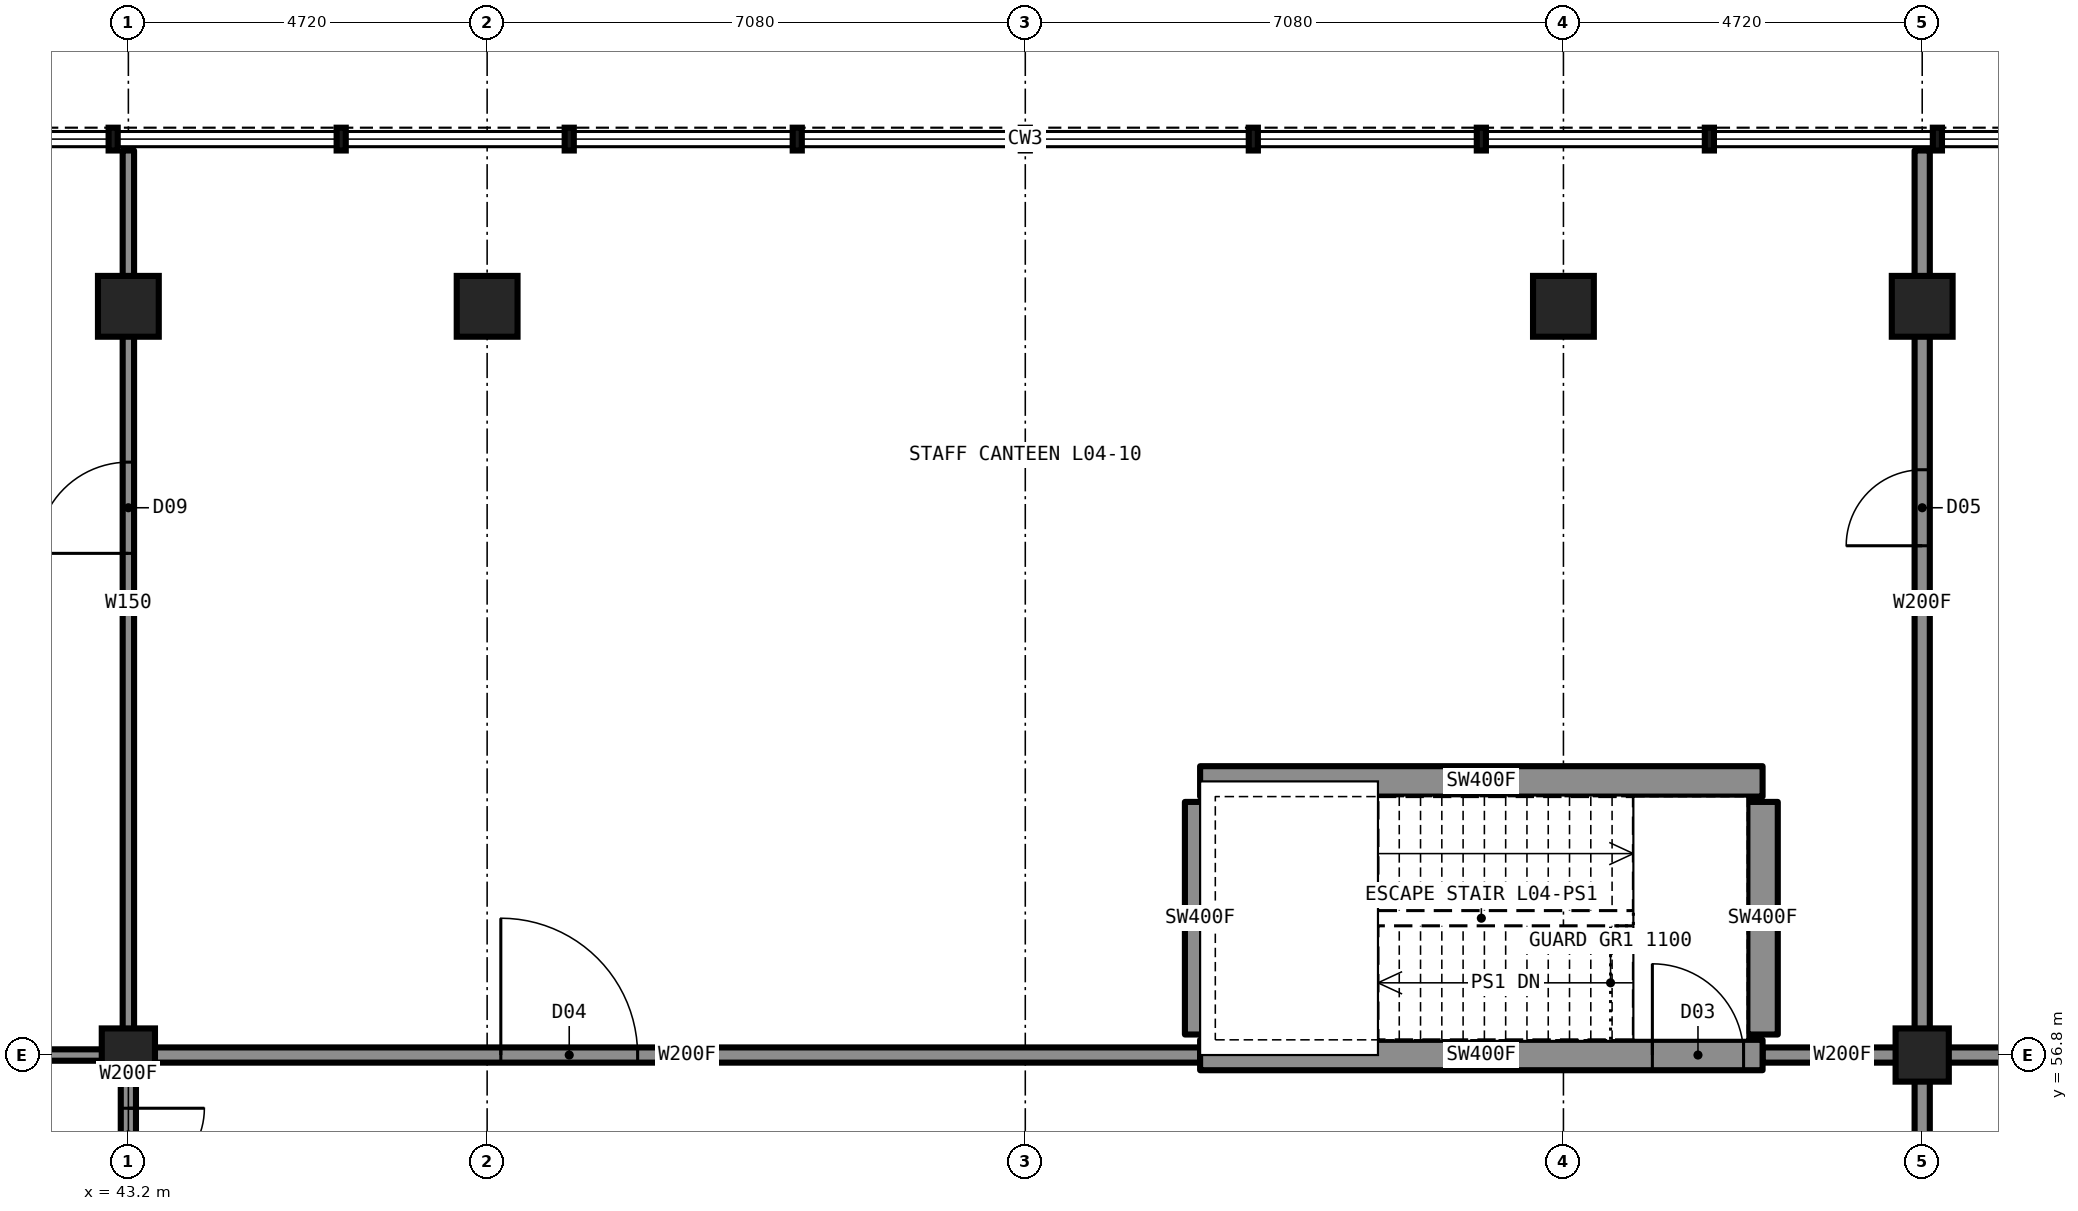
"""IFC4 building model, lengths in metres.
Left out: names, types, materials, properties, quantities, classifications, styles, units other than length and angle.
Written with IfcOpenShell. Run it as: python <this file> out.ifc"""

import sys

from ifc_helpers import new_model, si_unit, direction, frame, frame_2d, origin, origin_2d, place, context, subcontext, project, spatial, rectangle, hollow_rectangle, extrude, element, fill, save


model = new_model("IFC4")
c1 = context("Model", 3, precision=1e-05, world=origin(), true_north=direction((0.0, 1.0)))
c2 = subcontext(c1, "Body", "Model", "MODEL_VIEW")
j1 = project(units=[si_unit("LENGTHUNIT", "METRE"), si_unit("PLANEANGLEUNIT", "RADIAN")], contexts=[c1])
p1 = place(None, origin())
s1 = spatial("IfcSite", under=j1, at=p1, CompositionType="ELEMENT")
p2 = place(p1, origin())
s2 = spatial("IfcBuilding", under=s1, at=p2, CompositionType="ELEMENT")
p3 = place(p2, frame((0.0, 0.0, 20.5)))
s3 = spatial("IfcBuildingStorey", under=s2, at=p3, CompositionType="ELEMENT", Elevation=20.5)
for number, where, z_axis, x_axis in (
    (1, (43.2, 66.65, 0.0), (0.0, 0.0, 1.0), (1.0, 0.0, 0.0)),
    (2, (47.92, 66.65, 0.0), (0.0, 0.0, 1.0), (1.0, 0.0, 0.0)),
    (3, (62.08, 66.65, 0.0), (0.0, 0.0, 1.0), (1.0, 0.0, 0.0)),
    (4, (66.8, 66.65, 0.0), (0.0, 0.0, 1.0), (1.0, 0.0, 0.0)),
):
    element("IfcColumn", number, at=place(p3, frame(where, z_axis=z_axis, x_axis=x_axis)), inside=s3, PredefinedType="COLUMN", context=c2, shape_type="SweptSolid", body=[
        extrude(hollow_rectangle(XDim=0.8, YDim=0.8, WallThickness=0.05, at=origin_2d()), origin(), (0.0, 0.0, 1.0), 4.5),
    ])
for number, where, z_axis, x_axis in (
    (5, (43.2, 56.8, 0.0), (0.0, 0.0, 1.0), (1.0, 0.0, 0.0)),
    (6, (66.8, 56.8, 0.0), (0.0, 0.0, 1.0), (1.0, 0.0, 0.0)),
):
    element("IfcColumn", number, at=place(p3, frame(where, z_axis=z_axis, x_axis=x_axis)), inside=s3, PredefinedType="COLUMN", context=c2, shape_type="SweptSolid", body=[
        extrude(hollow_rectangle(XDim=0.7, YDim=0.7, WallThickness=0.06, at=origin_2d()), origin(), (0.0, 0.0, 1.0), 4.5),
    ])
p4 = place(p3, frame((43.2, 56.8, 0.0), z_axis=(0.0, 0.0, 1.0), x_axis=(1.0, 0.0, 0.0)))
e7 = element("IfcWall", 7, at=p4, inside=s3, PredefinedType="PARTITIONING", context=c2, shape_type="SweptSolid", body=[
    extrude(rectangle(XDim=14.1, YDim=0.2, at=frame_2d((7.05, 0.0))), origin(), (0.0, 0.0, 1.0), 4.33),
])
p5 = place(p4, frame((4.9, 0.0, 0.0)))
e8 = element("IfcOpeningElement", 8, at=p5, cuts=e7, PredefinedType="OPENING", context=c2, shape_type="SweptSolid", body=[
    extrude(rectangle(XDim=1.8, YDim=2.2, at=frame_2d((0.9, 1.1))), frame((0.0, 0.11, 0.0), z_axis=(0.0, -1.0, 0.0), x_axis=(1.0, 0.0, 0.0)), (0.0, 0.0, 1.0), 0.22),
])
p6 = place(p3, frame((64.7, 56.8, 0.0), z_axis=(0.0, 0.0, 1.0), x_axis=(1.0, 0.0, 0.0)))
e9 = element("IfcWall", 9, at=p6, inside=s3, PredefinedType="PARTITIONING", context=c2, shape_type="SweptSolid", body=[
    extrude(rectangle(XDim=2.1, YDim=0.2, at=frame_2d((1.05, 0.0))), origin(), (0.0, 0.0, 1.0), 4.33),
])
p7 = place(p3, frame((66.8, 56.8, 0.0), z_axis=(0.0, 0.0, 1.0), x_axis=(1.0, 0.0, 0.0)))
e10 = element("IfcWall", 10, at=p7, inside=s3, PredefinedType="PARTITIONING", context=c2, shape_type="SweptSolid", body=[
    extrude(rectangle(XDim=11.945, YDim=0.2, at=frame_2d((5.973, 0.0))), origin(), (0.0, 0.0, 1.0), 3.13),
])
p8 = place(p7, frame((5.7, 0.0, 0.0)))
e11 = element("IfcOpeningElement", 11, at=p8, cuts=e10, PredefinedType="OPENING", context=c2, shape_type="SweptSolid", body=[
    extrude(rectangle(XDim=1.0, YDim=2.1, at=frame_2d((0.5, 1.05))), frame((0.0, 0.11, 0.0), z_axis=(0.0, -1.0, 0.0), x_axis=(1.0, 0.0, 0.0)), (0.0, 0.0, 1.0), 0.22),
])
p9 = place(p3, frame((57.3, 56.8, 0.0), z_axis=(0.0, 0.0, 1.0), x_axis=(1.0, 0.0, 0.0)))
e12 = element("IfcWall", 12, at=p9, inside=s3, PredefinedType="SHEAR", context=c2, shape_type="SweptSolid", body=[
    extrude(rectangle(XDim=7.4, YDim=0.4, at=frame_2d((3.7, 0.0))), origin(), (0.0, 0.0, 1.0), 4.5),
])
p10 = place(p9, frame((5.95, 0.0, 0.0)))
e13 = element("IfcOpeningElement", 13, at=p10, cuts=e12, PredefinedType="OPENING", context=c2, shape_type="SweptSolid", body=[
    extrude(rectangle(XDim=1.2, YDim=2.2, at=frame_2d((0.6, 1.1))), frame((0.0, 0.21, 0.0), z_axis=(0.0, -1.0, 0.0), x_axis=(1.0, 0.0, 0.0)), (0.0, 0.0, 1.0), 0.42),
])
p11 = place(p3, frame((57.3, 60.4, 0.0), z_axis=(0.0, 0.0, 1.0), x_axis=(1.0, 0.0, 0.0)))
e14 = element("IfcWall", 14, at=p11, inside=s3, PredefinedType="SHEAR", context=c2, shape_type="SweptSolid", body=[
    extrude(rectangle(XDim=7.4, YDim=0.4, at=frame_2d((3.7, 0.0))), origin(), (0.0, 0.0, 1.0), 4.5),
])
p12 = place(p3, frame((43.2, 56.8, 0.0), z_axis=(0.0, 0.0, 1.0), x_axis=(0.0, 1.0, 0.0)))
e15 = element("IfcWall", 15, at=p12, inside=s3, PredefinedType="PARTITIONING", context=c2, shape_type="SweptSolid", body=[
    extrude(rectangle(XDim=11.9, YDim=0.15, at=frame_2d((5.95, 0.0))), origin(), (0.0, 0.0, 1.0), 3.13),
])
p13 = place(p12, frame((6.6, 0.0, 0.0)))
e16 = element("IfcOpeningElement", 16, at=p13, cuts=e15, PredefinedType="OPENING", context=c2, shape_type="SweptSolid", body=[
    extrude(rectangle(XDim=1.2, YDim=2.2, at=frame_2d((0.6, 1.1))), frame((0.0, 0.085, 0.0), z_axis=(0.0, -1.0, 0.0), x_axis=(1.0, 0.0, 0.0)), (0.0, 0.0, 1.0), 0.17),
])
p14 = place(p3, frame((66.8, 42.7, 0.0), z_axis=(0.0, 0.0, 1.0), x_axis=(0.0, 1.0, 0.0)))
e17 = element("IfcWall", 17, at=p14, inside=s3, PredefinedType="PARTITIONING", context=c2, shape_type="SweptSolid", body=[
    extrude(rectangle(XDim=14.1, YDim=0.2, at=frame_2d((7.05, 0.0))), origin(), (0.0, 0.0, 1.0), 4.33),
])
p15 = place(p14, frame((8.8, 0.0, 0.0)))
e18 = element("IfcOpeningElement", 18, at=p15, cuts=e17, PredefinedType="OPENING", context=c2, shape_type="SweptSolid", body=[
    extrude(rectangle(XDim=1.0, YDim=2.1, at=frame_2d((0.5, 1.05))), frame((0.0, 0.11, 0.0), z_axis=(0.0, -1.0, 0.0), x_axis=(1.0, 0.0, 0.0)), (0.0, 0.0, 1.0), 0.22),
])
p16 = place(p3, frame((66.8, 56.8, 0.0), z_axis=(0.0, 0.0, 1.0), x_axis=(0.0, 1.0, 0.0)))
e19 = element("IfcWall", 19, at=p16, inside=s3, PredefinedType="PARTITIONING", context=c2, shape_type="SweptSolid", body=[
    extrude(rectangle(XDim=11.9, YDim=0.2, at=frame_2d((5.95, 0.0))), origin(), (0.0, 0.0, 1.0), 3.13),
])
p17 = place(p16, frame((6.7, 0.0, 0.0)))
e20 = element("IfcOpeningElement", 20, at=p17, cuts=e19, PredefinedType="OPENING", context=c2, shape_type="SweptSolid", body=[
    extrude(rectangle(XDim=1.0, YDim=2.1, at=frame_2d((0.5, 1.05))), frame((0.0, 0.11, 0.0), z_axis=(0.0, -1.0, 0.0), x_axis=(1.0, 0.0, 0.0)), (0.0, 0.0, 1.0), 0.22),
])
for number, where, z_axis, x_axis in (
    (21, (57.3, 57.07, 0.0), (0.0, 0.0, 1.0), (0.0, 1.0, 0.0)),
    (22, (64.7, 57.07, 0.0), (0.0, 0.0, 1.0), (0.0, 1.0, 0.0)),
):
    element("IfcWall", number, at=place(p3, frame(where, z_axis=z_axis, x_axis=x_axis)), inside=s3, PredefinedType="SHEAR", context=c2, shape_type="SweptSolid", body=[
        extrude(rectangle(XDim=3.06, YDim=0.4, at=frame_2d((1.53, 0.0))), origin(), (0.0, 0.0, 1.0), 4.5),
    ])
p18 = place(p3, frame((43.2, 56.74, 0.0), z_axis=(0.0, 0.0, 1.0), x_axis=(0.0, -1.0, 0.0)))
e23 = element("IfcWall", 23, at=p18, inside=s3, PredefinedType="PARTITIONING", context=c2, shape_type="SweptSolid", body=[
    extrude(rectangle(XDim=1.98, YDim=0.2, at=frame_2d((0.99, 0.0))), origin(), (0.0, 0.0, 1.0), 4.33),
])
p19 = place(p18, frame((0.64, 0.0, 0.0)))
e24 = element("IfcOpeningElement", 24, at=p19, cuts=e23, PredefinedType="OPENING", context=c2, shape_type="SweptSolid", body=[
    extrude(rectangle(XDim=1.0, YDim=2.1, at=frame_2d((0.5, 1.05))), frame((0.0, 0.11, 0.0), z_axis=(0.0, -1.0, 0.0), x_axis=(1.0, 0.0, 0.0)), (0.0, 0.0, 1.0), 0.22),
])
p20 = place(p3, frame((39.76, 56.8, 0.0), z_axis=(0.0, 0.0, 1.0), x_axis=(1.0, 0.0, 0.0)))
e25 = element("IfcWall", 25, at=p20, inside=s3, PredefinedType="PARTITIONING", context=c2, shape_type="SweptSolid", body=[
    extrude(rectangle(XDim=3.38, YDim=0.15, at=frame_2d((1.69, 0.0))), origin(), (0.0, 0.0, 1.0), 3.13),
])
p21 = place(p10, origin())
e26 = element("IfcDoor", 26, at=p21, inside=s3, OperationType="SINGLE_SWING_LEFT", PredefinedType="DOOR", context=c2, shape_type="SweptSolid", body=[
    extrude(rectangle(XDim=1.2, YDim=2.2, at=frame_2d((0.6, 1.1))), frame((0.0, 0.025, 0.0), z_axis=(0.0, -1.0, 0.0), x_axis=(1.0, 0.0, 0.0)), (0.0, 0.0, 1.0), 0.05),
])
fill(e13, e26)
p22 = place(p13, origin())
e27 = element("IfcDoor", 27, at=p22, inside=s3, OperationType="SINGLE_SWING_LEFT", PredefinedType="DOOR", context=c2, shape_type="SweptSolid", body=[
    extrude(rectangle(XDim=1.2, YDim=2.2, at=frame_2d((0.6, 1.1))), frame((0.0, 0.025, 0.0), z_axis=(0.0, -1.0, 0.0), x_axis=(1.0, 0.0, 0.0)), (0.0, 0.0, 1.0), 0.05),
])
fill(e16, e27)
p23 = place(p5, origin())
e28 = element("IfcDoor", 28, at=p23, inside=s3, OperationType="DOUBLE_DOOR_SINGLE_SWING", PredefinedType="DOOR", context=c2, shape_type="SweptSolid", body=[
    extrude(rectangle(XDim=1.8, YDim=2.2, at=frame_2d((0.9, 1.1))), frame((0.0, 0.025, 0.0), z_axis=(0.0, -1.0, 0.0), x_axis=(1.0, 0.0, 0.0)), (0.0, 0.0, 1.0), 0.05),
])
fill(e8, e28)
p24 = place(p17, origin())
e29 = element("IfcDoor", 29, at=p24, inside=s3, OperationType="SINGLE_SWING_LEFT", PredefinedType="DOOR", context=c2, shape_type="SweptSolid", body=[
    extrude(rectangle(XDim=1.0, YDim=2.1, at=frame_2d((0.5, 1.05))), frame((0.0, 0.025, 0.0), z_axis=(0.0, -1.0, 0.0), x_axis=(1.0, 0.0, 0.0)), (0.0, 0.0, 1.0), 0.05),
])
fill(e20, e29)
p25 = place(p19, origin())
e30 = element("IfcDoor", 30, at=p25, inside=s3, OperationType="SINGLE_SWING_LEFT", PredefinedType="DOOR", context=c2, shape_type="SweptSolid", body=[
    extrude(rectangle(XDim=1.0, YDim=2.1, at=frame_2d((0.5, 1.05))), frame((0.0, 0.025, 0.0), z_axis=(0.0, -1.0, 0.0), x_axis=(1.0, 0.0, 0.0)), (0.0, 0.0, 1.0), 0.05),
])
fill(e24, e30)
save(model, sys.argv[1])
